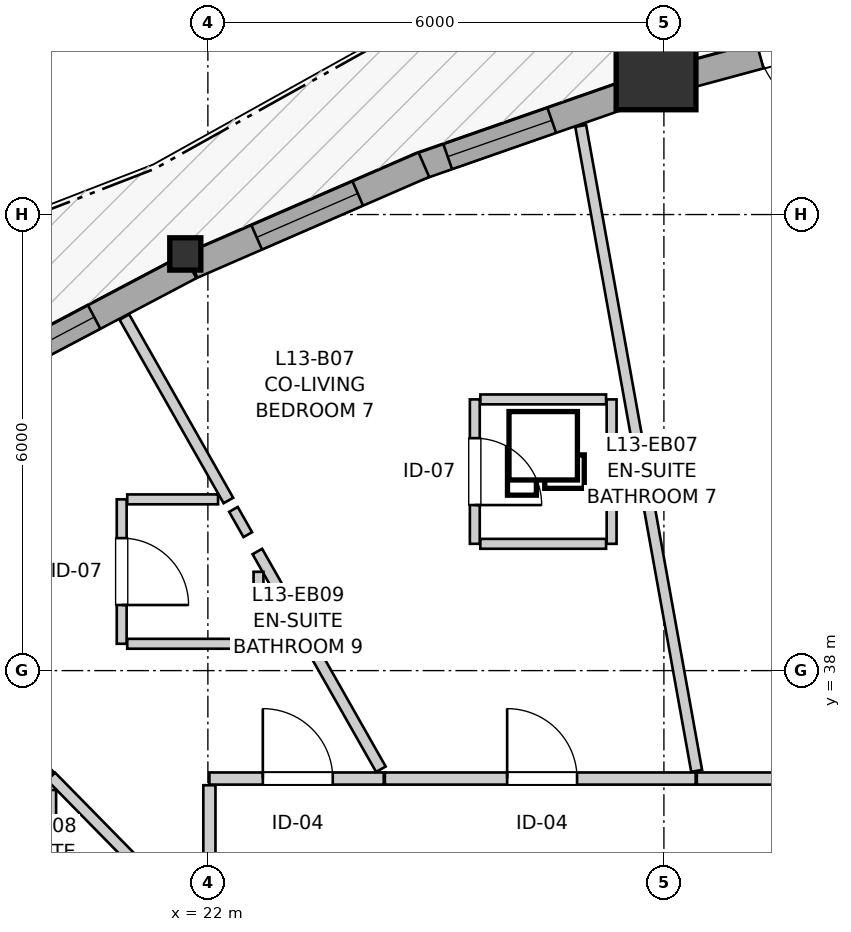
"""IFC4 building model, lengths in metres.
Left out: names, types, materials, properties, quantities, classifications, styles, units other than length and angle.
Written with IfcOpenShell. Run it as: python <this file> out.ifc"""

import sys

from ifc_helpers import new_model, si_unit, direction, frame, frame_2d, origin, origin_2d, place, context, subcontext, project, spatial, rectangle, i_section, extrude, source, transform, mapped, element, fill, save


model = new_model("IFC4")
c1 = context("Model", 3, precision=1e-05, world=origin(), true_north=direction((0.0, 1.0)))
c2 = subcontext(c1, "Body", "Model", "MODEL_VIEW")
j1 = project(units=[si_unit("LENGTHUNIT", "METRE"), si_unit("PLANEANGLEUNIT", "RADIAN")], contexts=[c1])
p1 = place(None, origin())
s1 = spatial("IfcSite", under=j1, at=p1, CompositionType="ELEMENT")
p2 = place(p1, origin())
s2 = spatial("IfcBuilding", under=s1, at=p2, CompositionType="ELEMENT")
p3 = place(p2, frame((0.0, 0.0, 46.2)))
s3 = spatial("IfcBuildingStorey", under=s2, at=p3, CompositionType="ELEMENT", Elevation=46.2)
m1 = source(origin(), c2, "Body", "SweptSolid", [
    extrude(rectangle(XDim=1.05, YDim=1.05, at=origin_2d()), origin(), (0.0, 0.0, 1.0), 2.94),
])
p4 = place(p3, frame((27.896, 45.904, 0.0), z_axis=(0.0, 0.0, 1.0), x_axis=(1.0, 0.0, 0.0)))
e1 = element("IfcColumn", 1, at=p4, inside=s3, PredefinedType="COLUMN", context=c2, shape_type="MappedRepresentation", body=[
    mapped(m1, transform((0.0, 0.0, 0.0), x_axis=(1.0, 0.0, 0.0), y_axis=(0.0, 1.0, 0.0), z_axis=(0.0, 0.0, 1.0), scale=1.0)),
])
m2 = source(origin(), c2, "Body", "SweptSolid", [
    extrude(i_section(OverallWidth=0.409, OverallDepth=0.425, WebThickness=0.03, FlangeThickness=0.048, FilletRadius=0.015, at=origin_2d()), origin(), (0.0, 0.0, 1.0), 2.94),
])
p5 = place(p3, frame((21.703, 43.482, 0.0), z_axis=(0.0, 0.0, 1.0), x_axis=(1.0, 0.0, 0.0)))
e2 = element("IfcColumn", 2, at=p5, inside=s3, PredefinedType="PILASTER", context=c2, shape_type="MappedRepresentation", body=[
    mapped(m2, transform((0.0, 0.0, 0.0), x_axis=(1.0, 0.0, 0.0), y_axis=(0.0, 1.0, 0.0), z_axis=(0.0, 0.0, 1.0), scale=1.0)),
])
p6 = place(p3, frame((31.263, 46.631, 0.0), z_axis=(0.0, 0.0, 1.0), x_axis=(-0.965460187066, -0.260550623086, 0.0)))
e3 = element("IfcWall", 3, at=p6, inside=s3, PredefinedType="SOLIDWALL", context=c2, shape_type="SweptSolid", body=[
    extrude(rectangle(XDim=3.14, YDim=0.35, at=frame_2d((1.57, 0.0))), origin(), (0.0, 0.0, 1.0), 2.42),
])
p7 = place(p6, frame((1.07, 0.0, 0.0)))
e4 = element("IfcOpeningElement", 4, at=p7, cuts=e3, PredefinedType="OPENING", context=c2, shape_type="SweptSolid", body=[
    extrude(rectangle(XDim=1.0, YDim=2.1, at=frame_2d((0.5, 1.05))), frame((0.0, 0.185, 0.0), z_axis=(0.0, -1.0, 0.0), x_axis=(1.0, 0.0, 0.0)), (0.0, 0.0, 1.0), 0.37),
])
p8 = place(p3, frame((27.671, 45.64, 0.0), z_axis=(0.0, 0.0, 1.0), x_axis=(-0.944140624307, -0.329542837175, 0.0)))
e5 = element("IfcWall", 5, at=p8, inside=s3, PredefinedType="SOLIDWALL", context=c2, shape_type="SweptSolid", body=[
    extrude(rectangle(XDim=3.084, YDim=0.35, at=frame_2d((1.542, 0.0))), origin(), (0.0, 0.0, 1.0), 2.42),
])
p9 = place(p8, frame((1.214, 0.0, 0.82)))
e6 = element("IfcOpeningElement", 6, at=p9, cuts=e5, PredefinedType="OPENING", context=c2, shape_type="SweptSolid", body=[
    extrude(rectangle(XDim=1.45, YDim=1.25, at=frame_2d((0.725, 0.625))), frame((0.0, 0.185, 0.0), z_axis=(0.0, -1.0, 0.0), x_axis=(1.0, 0.0, 0.0)), (0.0, 0.0, 1.0), 0.37),
])
p10 = place(p3, frame((24.842, 44.656, 0.0), z_axis=(0.0, 0.0, 1.0), x_axis=(-0.917071223009, -0.398723427866, 0.0)))
e7 = element("IfcWall", 7, at=p10, inside=s3, PredefinedType="SOLIDWALL", context=c2, shape_type="SweptSolid", body=[
    extrude(rectangle(XDim=3.327, YDim=0.35, at=frame_2d((1.663, 0.0))), origin(), (0.0, 0.0, 1.0), 2.42),
])
p11 = place(p10, frame((0.948, 0.0, 0.82)))
e8 = element("IfcOpeningElement", 8, at=p11, cuts=e7, PredefinedType="OPENING", context=c2, shape_type="SweptSolid", body=[
    extrude(rectangle(XDim=1.45, YDim=1.25, at=frame_2d((0.725, 0.625))), frame((0.0, 0.185, 0.0), z_axis=(0.0, -1.0, 0.0), x_axis=(1.0, 0.0, 0.0)), (0.0, 0.0, 1.0), 0.37),
])
p12 = place(p3, frame((21.767, 43.318, 0.0), z_axis=(0.0, 0.0, 1.0), x_axis=(-0.884379674805, -0.466768240984, 0.0)))
e9 = element("IfcWall", 9, at=p12, inside=s3, PredefinedType="SOLIDWALL", context=c2, shape_type="SweptSolid", body=[
    extrude(rectangle(XDim=3.308, YDim=0.35, at=frame_2d((1.654, 0.0))), origin(), (0.0, 0.0, 1.0), 2.42),
])
p13 = place(p12, frame((1.428, 0.0, 0.82)))
e10 = element("IfcOpeningElement", 10, at=p13, cuts=e9, PredefinedType="OPENING", context=c2, shape_type="SweptSolid", body=[
    extrude(rectangle(XDim=1.45, YDim=1.25, at=frame_2d((0.725, 0.625))), frame((0.0, 0.185, 0.0), z_axis=(0.0, -1.0, 0.0), x_axis=(1.0, 0.0, 0.0)), (0.0, 0.0, 1.0), 0.37),
])
p14 = place(p3, frame((28.433, 36.58, 0.0), z_axis=(0.0, 0.0, 1.0), x_axis=(1.0, 0.0, 0.0)))
e11 = element("IfcWall", 11, at=p14, inside=s3, PredefinedType="PARTITIONING", context=c2, shape_type="SweptSolid", body=[
    extrude(rectangle(XDim=4.651, YDim=0.16, at=frame_2d((2.325, 0.0))), origin(), (0.0, 0.0, 1.0), 2.94),
])
p15 = place(p14, frame((1.676, 0.0, 0.0)))
e12 = element("IfcOpeningElement", 12, at=p15, cuts=e11, PredefinedType="OPENING", context=c2, shape_type="SweptSolid", body=[
    extrude(rectangle(XDim=1.3, YDim=2.1, at=frame_2d((0.65, 1.05))), frame((0.0, 0.09, 0.0), z_axis=(0.0, -1.0, 0.0), x_axis=(1.0, 0.0, 0.0)), (0.0, 0.0, 1.0), 0.18),
])
p16 = place(p3, frame((24.329, 36.58, 0.0), z_axis=(0.0, 0.0, 1.0), x_axis=(1.0, 0.0, 0.0)))
e13 = element("IfcWall", 13, at=p16, inside=s3, PredefinedType="PARTITIONING", context=c2, shape_type="SweptSolid", body=[
    extrude(rectangle(XDim=4.089, YDim=0.16, at=frame_2d((2.044, 0.0))), origin(), (0.0, 0.0, 1.0), 2.548),
])
p17 = place(p16, frame((1.608, 0.0, 0.0)))
e14 = element("IfcOpeningElement", 14, at=p17, cuts=e13, PredefinedType="OPENING", context=c2, shape_type="SweptSolid", body=[
    extrude(rectangle(XDim=0.92, YDim=2.1, at=frame_2d((0.46, 1.05))), frame((0.0, 0.09, 0.0), z_axis=(0.0, -1.0, 0.0), x_axis=(1.0, 0.0, 0.0)), (0.0, 0.0, 1.0), 0.18),
])
p18 = place(p3, frame((22.02, 36.58, 0.0), z_axis=(0.0, 0.0, 1.0), x_axis=(1.0, 0.0, 0.0)))
e15 = element("IfcWall", 15, at=p18, inside=s3, PredefinedType="PARTITIONING", context=c2, shape_type="SweptSolid", body=[
    extrude(rectangle(XDim=2.294, YDim=0.16, at=frame_2d((1.147, 0.0))), origin(), (0.0, 0.0, 1.0), 2.548),
])
p19 = place(p18, frame((0.703, 0.0, 0.0)))
e16 = element("IfcOpeningElement", 16, at=p19, cuts=e15, PredefinedType="OPENING", context=c2, shape_type="SweptSolid", body=[
    extrude(rectangle(XDim=0.92, YDim=2.1, at=frame_2d((0.46, 1.05))), frame((0.0, 0.09, 0.0), z_axis=(0.0, -1.0, 0.0), x_axis=(1.0, 0.0, 0.0)), (0.0, 0.0, 1.0), 0.18),
])
p20 = place(p3, frame((25.512, 41.568, 0.0), z_axis=(0.0, 0.0, 1.0), x_axis=(0.0, -1.0, 0.0)))
e17 = element("IfcWall", 17, at=p20, inside=s3, PredefinedType="PARTITIONING", context=c2, shape_type="SweptSolid", body=[
    extrude(rectangle(XDim=1.9, YDim=0.13, at=frame_2d((0.95, 0.0))), origin(), (0.0, 0.0, 1.0), 2.94),
])
p21 = place(p20, frame((0.51, 0.0, 0.0)))
e18 = element("IfcOpeningElement", 18, at=p21, cuts=e17, PredefinedType="OPENING", context=c2, shape_type="SweptSolid", body=[
    extrude(rectangle(XDim=0.88, YDim=2.05, at=frame_2d((0.44, 1.025))), frame((0.0, 0.075, 0.0), z_axis=(0.0, -1.0, 0.0), x_axis=(1.0, 0.0, 0.0)), (0.0, 0.0, 1.0), 0.15),
])
p22 = place(p3, frame((20.866, 40.253, 0.0), z_axis=(0.0, 0.0, 1.0), x_axis=(0.0, -1.0, 0.0)))
e19 = element("IfcWall", 19, at=p22, inside=s3, PredefinedType="PARTITIONING", context=c2, shape_type="SweptSolid", body=[
    extrude(rectangle(XDim=1.9, YDim=0.13, at=frame_2d((0.95, 0.0))), origin(), (0.0, 0.0, 1.0), 2.94),
])
p23 = place(p22, frame((0.51, 0.0, 0.0)))
e20 = element("IfcOpeningElement", 20, at=p23, cuts=e19, PredefinedType="OPENING", context=c2, shape_type="SweptSolid", body=[
    extrude(rectangle(XDim=0.88, YDim=2.05, at=frame_2d((0.44, 1.025))), frame((0.0, 0.075, 0.0), z_axis=(0.0, -1.0, 0.0), x_axis=(1.0, 0.0, 0.0)), (0.0, 0.0, 1.0), 0.15),
])
p24 = place(p3, frame((12.929, 37.365, 0.0), z_axis=(0.0, 0.0, 1.0), x_axis=(0.83754252852, -0.54637213776, 0.0)))
e21 = element("IfcWall", 21, at=p24, inside=s3, PredefinedType="PARTITIONING", context=c2, shape_type="SweptSolid", body=[
    extrude(rectangle(XDim=10.704, YDim=0.145, at=frame_2d((5.352, 0.0))), origin(), (0.0, 0.0, 1.0), 2.94),
])
p25 = place(p3, frame((26.905, 45.167, 0.0), z_axis=(0.0, 0.0, 1.0), x_axis=(0.176948932403, -0.984220033997, 0.0)))
e22 = element("IfcWall", 22, at=p25, inside=s3, PredefinedType="PARTITIONING", context=c2, shape_type="SweptSolid", body=[
    extrude(rectangle(XDim=8.622, YDim=0.145, at=frame_2d((4.311, 0.0))), origin(), (0.0, 0.0, 1.0), 2.94),
])
p26 = place(p3, frame((22.651, 39.567, 0.0), z_axis=(0.0, 0.0, 1.0), x_axis=(0.493566118786, -0.8697082766, 0.0)))
e23 = element("IfcWall", 23, at=p26, inside=s3, PredefinedType="PARTITIONING", context=c2, shape_type="SweptSolid", body=[
    extrude(rectangle(XDim=3.293, YDim=0.145, at=frame_2d((1.647, 0.0))), origin(), (0.0, 0.0, 1.0), 2.94),
])
p27 = place(p3, frame((19.938, 36.607, 0.0), z_axis=(0.0, 0.0, 1.0), x_axis=(0.700568911338, -0.713584753527, 0.0)))
e24 = element("IfcWall", 24, at=p27, inside=s3, PredefinedType="PARTITIONING", context=c2, shape_type="SweptSolid", body=[
    extrude(rectangle(XDim=2.776, YDim=0.145, at=frame_2d((1.388, 0.0))), origin(), (0.0, 0.0, 1.0), 2.308),
])
p28 = place(p3, frame((20.901, 42.651, 0.0), z_axis=(0.0, 0.0, 1.0), x_axis=(0.4934166236, -0.86979309928, 0.0)))
e25 = element("IfcWall", 25, at=p28, inside=s3, PredefinedType="PARTITIONING", context=c2, shape_type="SweptSolid", body=[
    extrude(rectangle(XDim=2.774, YDim=0.145, at=frame_2d((1.387, 0.0))), origin(), (0.0, 0.0, 1.0), 2.94),
])
p29 = place(p3, frame((22.02, 34.715, 0.0), z_axis=(0.0, 0.0, 1.0), x_axis=(0.0, 1.0, 0.0)))
e26 = element("IfcWall", 26, at=p29, inside=s3, PredefinedType="PARTITIONING", context=c2, shape_type="SweptSolid", body=[
    extrude(rectangle(XDim=1.777, YDim=0.16, at=frame_2d((0.888, 0.0))), origin(), (0.0, 0.0, 1.0), 2.94),
])
p30 = place(p3, frame((27.312, 39.668, 0.0), z_axis=(0.0, 0.0, 1.0), x_axis=(0.0, 1.0, 0.0)))
e27 = element("IfcWall", 27, at=p30, inside=s3, PredefinedType="PARTITIONING", context=c2, shape_type="SweptSolid", body=[
    extrude(rectangle(XDim=1.9, YDim=0.13, at=frame_2d((0.95, 0.0))), origin(), (0.0, 0.0, 1.0), 2.94),
])
p31 = place(p3, frame((25.585, 41.568, 0.0), z_axis=(0.0, 0.0, 1.0), x_axis=(1.0, 0.0, 0.0)))
e28 = element("IfcWall", 28, at=p31, inside=s3, PredefinedType="PARTITIONING", context=c2, shape_type="SweptSolid", body=[
    extrude(rectangle(XDim=1.654, YDim=0.13, at=frame_2d((0.827, 0.0))), origin(), (0.0, 0.0, 1.0), 2.508),
])
p32 = place(p3, frame((25.585, 39.668, 0.0), z_axis=(0.0, 0.0, 1.0), x_axis=(1.0, 0.0, 0.0)))
e29 = element("IfcWall", 29, at=p32, inside=s3, PredefinedType="PARTITIONING", context=c2, shape_type="SweptSolid", body=[
    extrude(rectangle(XDim=1.654, YDim=0.13, at=frame_2d((0.827, 0.0))), origin(), (0.0, 0.0, 1.0), 2.94),
])
p33 = place(p3, frame((20.939, 38.353, 0.0), z_axis=(0.0, 0.0, 1.0), x_axis=(1.0, 0.0, 0.0)))
e30 = element("IfcWall", 30, at=p33, inside=s3, PredefinedType="PARTITIONING", context=c2, shape_type="SweptSolid", body=[
    extrude(rectangle(XDim=1.727, YDim=0.13, at=frame_2d((0.864, 0.0))), origin(), (0.0, 0.0, 1.0), 2.94),
])
p34 = place(p3, frame((18.91, 37.653, 0.0), z_axis=(0.0, 0.0, 1.0), x_axis=(0.700686611827, -0.713469180838, 0.0)))
e31 = element("IfcWall", 31, at=p34, inside=s3, PredefinedType="PARTITIONING", context=c2, shape_type="SweptSolid", body=[
    extrude(rectangle(XDim=1.452, YDim=0.13, at=frame_2d((0.726, 0.0))), origin(), (0.0, 0.0, 1.0), 2.308),
])
p35 = place(p3, frame((20.939, 40.253, 0.0), z_axis=(0.0, 0.0, 1.0), x_axis=(1.0, 0.0, 0.0)))
e32 = element("IfcWall", 32, at=p35, inside=s3, PredefinedType="PARTITIONING", context=c2, shape_type="SweptSolid", body=[
    extrude(rectangle(XDim=1.195, YDim=0.13, at=frame_2d((0.597, 0.0))), origin(), (0.0, 0.0, 1.0), 2.94),
])
p36 = place(p3, frame((22.666, 38.426, 0.0), z_axis=(0.0, 0.0, 1.0), x_axis=(0.0, 1.0, 0.0)))
e33 = element("IfcWall", 33, at=p36, inside=s3, PredefinedType="PARTITIONING", context=c2, shape_type="SweptSolid", body=[
    extrude(rectangle(XDim=0.874, YDim=0.13, at=frame_2d((0.437, 0.0))), origin(), (0.0, 0.0, 1.0), 2.94),
])
p37 = place(p3, frame((19.938, 35.837, 0.0), z_axis=(0.0, 0.0, 1.0), x_axis=(0.0, 1.0, 0.0)))
e34 = element("IfcWall", 34, at=p37, inside=s3, PredefinedType="PARTITIONING", context=c2, shape_type="SweptSolid", body=[
    extrude(rectangle(XDim=0.592, YDim=0.13, at=frame_2d((0.296, 0.0))), origin(), (0.0, 0.0, 1.0), 2.94),
])
p38 = place(p3, frame((22.336, 40.121, 0.0), z_axis=(0.0, 0.0, 1.0), x_axis=(0.493383408092, -0.86981194095, 0.0)))
e35 = element("IfcWall", 35, at=p38, inside=s3, PredefinedType="PARTITIONING", context=c2, shape_type="SweptSolid", body=[
    extrude(rectangle(XDim=0.382, YDim=0.13, at=frame_2d((0.191, 0.0))), origin(), (0.0, 0.0, 1.0), 2.94),
])
m3 = source(origin(), c2, "Body", "SweptSolid", [
    extrude(rectangle(XDim=1.45, YDim=1.25, at=frame_2d((0.725, 0.625))), frame((0.0, 0.03, 0.0), z_axis=(0.0, -1.0, 0.0), x_axis=(1.0, 0.0, 0.0)), (0.0, 0.0, 1.0), 0.06),
])
p39 = place(p9, origin())
e36 = element("IfcWindow", 36, at=p39, inside=s3, PartitioningType="SINGLE_PANEL", PredefinedType="WINDOW", context=c2, shape_type="MappedRepresentation", body=[
    mapped(m3, transform((0.0, 0.0, 0.0), x_axis=(1.0, 0.0, 0.0), y_axis=(0.0, 1.0, 0.0), z_axis=(0.0, 0.0, 1.0), scale=1.0)),
])
fill(e6, e36)
p40 = place(p11, origin())
e37 = element("IfcWindow", 37, at=p40, inside=s3, PartitioningType="SINGLE_PANEL", PredefinedType="WINDOW", context=c2, shape_type="MappedRepresentation", body=[
    mapped(m3, transform((0.0, 0.0, 0.0), x_axis=(1.0, 0.0, 0.0), y_axis=(0.0, 1.0, 0.0), z_axis=(0.0, 0.0, 1.0), scale=1.0)),
])
fill(e8, e37)
p41 = place(p13, origin())
e38 = element("IfcWindow", 38, at=p41, inside=s3, PartitioningType="SINGLE_PANEL", PredefinedType="WINDOW", context=c2, shape_type="MappedRepresentation", body=[
    mapped(m3, transform((0.0, 0.0, 0.0), x_axis=(1.0, 0.0, 0.0), y_axis=(0.0, 1.0, 0.0), z_axis=(0.0, 0.0, 1.0), scale=1.0)),
])
fill(e10, e38)
m4 = source(origin(), c2, "Body", "SweptSolid", [
    extrude(rectangle(XDim=1.0, YDim=2.1, at=frame_2d((0.5, 1.05))), frame((0.0, 0.025, 0.0), z_axis=(0.0, -1.0, 0.0), x_axis=(1.0, 0.0, 0.0)), (0.0, 0.0, 1.0), 0.05),
])
p42 = place(p7, origin())
e39 = element("IfcDoor", 39, at=p42, inside=s3, OperationType="SINGLE_SWING_LEFT", PredefinedType="DOOR", context=c2, shape_type="MappedRepresentation", body=[
    mapped(m4, transform((0.0, 0.0, 0.0), x_axis=(1.0, 0.0, 0.0), y_axis=(0.0, 1.0, 0.0), z_axis=(0.0, 0.0, 1.0), scale=1.0)),
])
fill(e4, e39)
m5 = source(origin(), c2, "Body", "SweptSolid", [
    extrude(rectangle(XDim=0.92, YDim=2.1, at=frame_2d((0.46, 1.05))), frame((0.0, 0.025, 0.0), z_axis=(0.0, -1.0, 0.0), x_axis=(1.0, 0.0, 0.0)), (0.0, 0.0, 1.0), 0.05),
])
p43 = place(p17, origin())
e40 = element("IfcDoor", 40, at=p43, inside=s3, OperationType="SINGLE_SWING_LEFT", PredefinedType="DOOR", context=c2, shape_type="MappedRepresentation", body=[
    mapped(m5, transform((0.0, 0.0, 0.0), x_axis=(1.0, 0.0, 0.0), y_axis=(0.0, 1.0, 0.0), z_axis=(0.0, 0.0, 1.0), scale=1.0)),
])
fill(e14, e40)
p44 = place(p19, origin())
e41 = element("IfcDoor", 41, at=p44, inside=s3, OperationType="SINGLE_SWING_LEFT", PredefinedType="DOOR", context=c2, shape_type="MappedRepresentation", body=[
    mapped(m5, transform((0.0, 0.0, 0.0), x_axis=(1.0, 0.0, 0.0), y_axis=(0.0, 1.0, 0.0), z_axis=(0.0, 0.0, 1.0), scale=1.0)),
])
fill(e16, e41)
m6 = source(origin(), c2, "Body", "SweptSolid", [
    extrude(rectangle(XDim=0.88, YDim=2.05, at=frame_2d((0.44, 1.025))), frame((0.0, 0.025, 0.0), z_axis=(0.0, -1.0, 0.0), x_axis=(1.0, 0.0, 0.0)), (0.0, 0.0, 1.0), 0.05),
])
p45 = place(p21, origin())
e42 = element("IfcDoor", 42, at=p45, inside=s3, OperationType="SINGLE_SWING_RIGHT", PredefinedType="DOOR", context=c2, shape_type="MappedRepresentation", body=[
    mapped(m6, transform((0.0, 0.0, 0.0), x_axis=(1.0, 0.0, 0.0), y_axis=(0.0, 1.0, 0.0), z_axis=(0.0, 0.0, 1.0), scale=1.0)),
])
fill(e18, e42)
p46 = place(p23, origin())
e43 = element("IfcDoor", 43, at=p46, inside=s3, OperationType="SINGLE_SWING_RIGHT", PredefinedType="DOOR", context=c2, shape_type="MappedRepresentation", body=[
    mapped(m6, transform((0.0, 0.0, 0.0), x_axis=(1.0, 0.0, 0.0), y_axis=(0.0, 1.0, 0.0), z_axis=(0.0, 0.0, 1.0), scale=1.0)),
])
fill(e20, e43)
save(model, sys.argv[1])
